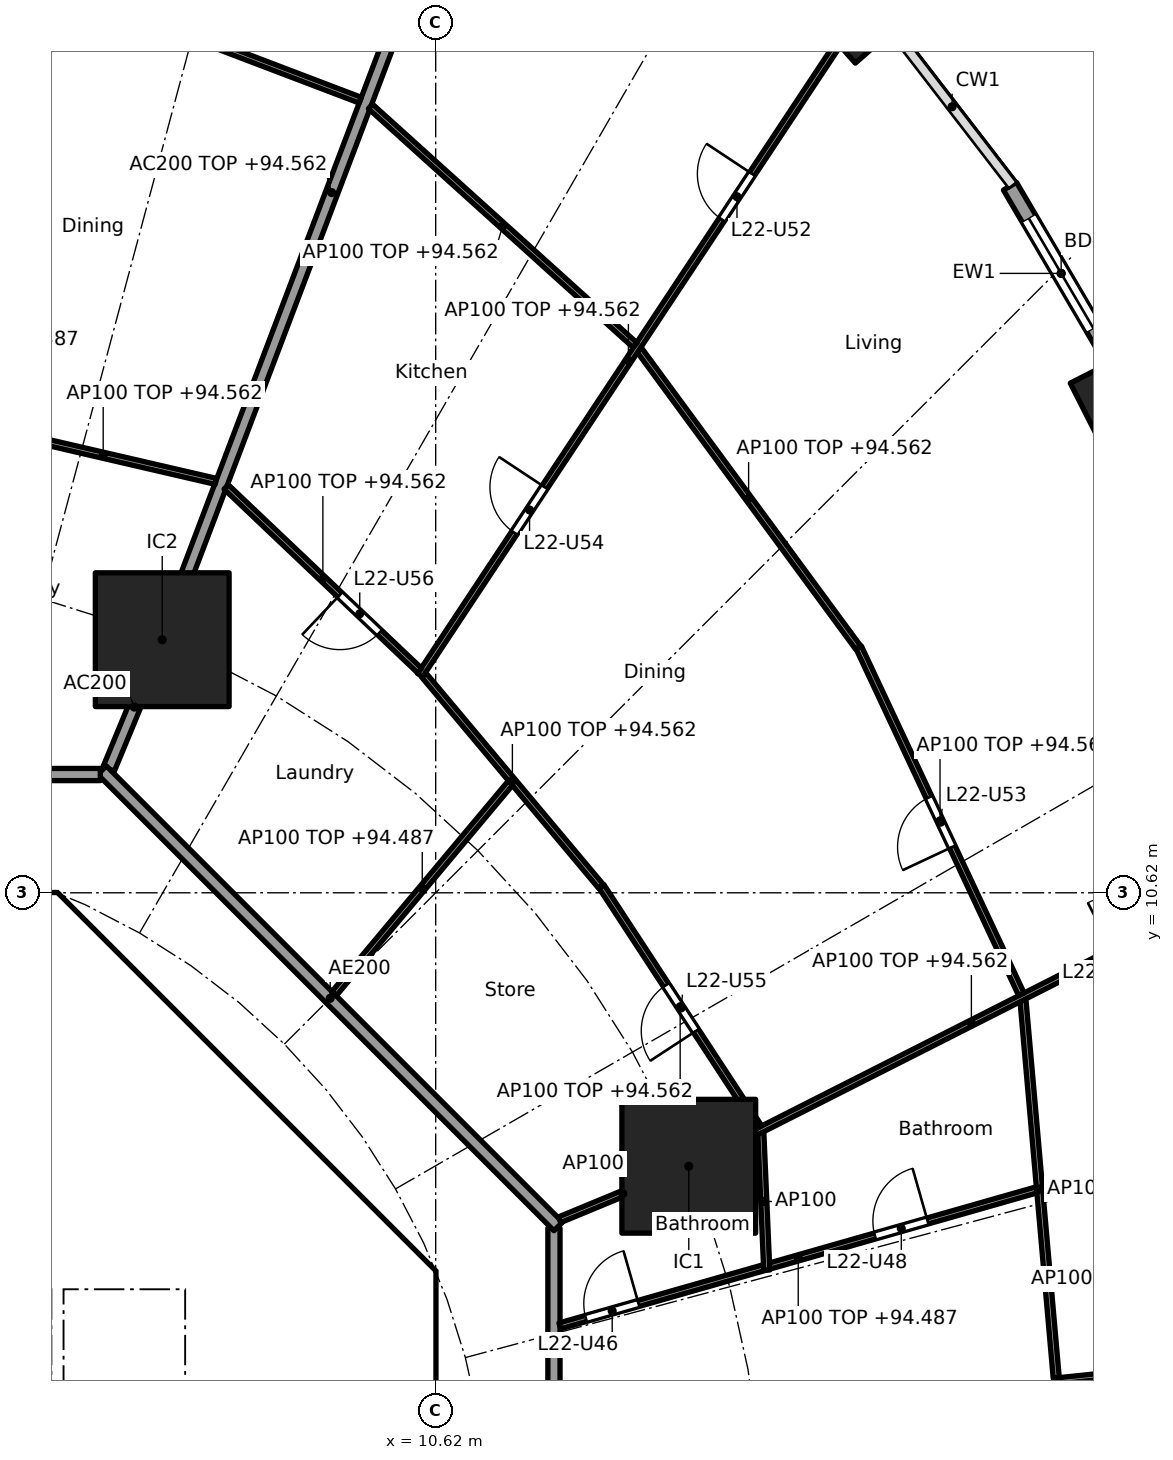
"""IFC4 building model, lengths in metres.
Left out: names, types, materials, properties, quantities, classifications, styles, units other than length and angle.
Written with IfcOpenShell. Run it as: python <this file> out.ifc"""

import sys

from ifc_helpers import new_model, si_unit, direction, frame, frame_2d, origin, origin_2d, place, context, subcontext, project, spatial, polyline, rectangle, hollow_rectangle, outline, extrude, element, fill, save


model = new_model("IFC4")
c1 = context("Model", 3, precision=1e-05, world=origin(), true_north=direction((0.0, 1.0)))
c2 = subcontext(c1, "Body", "Model", "MODEL_VIEW")
j1 = project(units=[si_unit("LENGTHUNIT", "METRE"), si_unit("PLANEANGLEUNIT", "RADIAN")], contexts=[c1])
p1 = place(None, origin())
s1 = spatial("IfcSite", under=j1, at=p1, CompositionType="ELEMENT")
p2 = place(p1, origin())
s2 = spatial("IfcBuilding", under=s1, at=p2, CompositionType="ELEMENT")
p3 = place(p2, frame((0.0, 0.0, 91.8)))
s3 = spatial("IfcBuildingStorey", under=s2, at=p3, CompositionType="ELEMENT", Elevation=91.8)
for number, where, z_axis, x_axis in (
    (1, (21.751, 18.625, 0.0), (0.0, 0.0, 1.0), (-0.452, 0.892, 0.0)),
    (2, (17.43, 25.049, 0.0), (0.0, 0.0, 1.0), (-0.66, 0.751, 0.0)),
):
    element("IfcColumn", number, at=place(p3, frame(where, z_axis=z_axis, x_axis=x_axis)), inside=s3, PredefinedType="COLUMN", context=c2, shape_type="SweptSolid", body=[
        extrude(hollow_rectangle(XDim=1.3, YDim=0.9, WallThickness=0.045, at=origin_2d()), origin(), (0.0, 0.0, 1.0), 3.7),
    ])
for number, where, z_axis, x_axis in (
    (3, (14.782, 6.123, 0.0), (0.0, 0.0, 1.0), (1.0, 0.0, 0.0)),
    (4, (6.123, 14.782, 0.0), (0.0, 0.0, 1.0), (1.0, 0.0, 0.0)),
):
    element("IfcColumn", number, at=place(p3, frame(where, z_axis=z_axis, x_axis=x_axis)), inside=s3, PredefinedType="COLUMN", context=c2, shape_type="SweptSolid", body=[
        extrude(rectangle(XDim=2.2, YDim=2.2, at=origin_2d()), origin(), (0.0, 0.0, 1.0), 3.7),
    ])
p4 = place(p3, frame((20.064, 22.24, 0.0), z_axis=(0.0, 0.0, 1.0), x_axis=(0.506297921217, -0.862358634775, 0.0)))
e5 = element("IfcWall", 5, at=p4, inside=s3, PredefinedType="SOLIDWALL", context=c2, shape_type="SweptSolid", body=[
    extrude(rectangle(XDim=3.325, YDim=0.25, at=frame_2d((1.662, 0.0))), origin(), (0.0, 0.0, 1.0), 3.44),
])
p5 = place(p4, frame((0.612, 0.0, 0.0)))
e6 = element("IfcOpeningElement", 6, at=p5, cuts=e5, PredefinedType="OPENING", context=c2, shape_type="SweptSolid", body=[
    extrude(rectangle(XDim=2.1, YDim=2.4, at=frame_2d((1.05, 1.2))), frame((0.0, 0.135, 0.0), z_axis=(0.0, -1.0, 0.0), x_axis=(1.0, 0.0, 0.0)), (0.0, 0.0, 1.0), 0.27),
])
p6 = place(p3, frame((9.988, 4.613, 0.0), z_axis=(0.0, 0.0, 1.0), x_axis=(-0.707106781187, 0.707106781187, 0.0)))
e7 = element("IfcWall", 7, at=p6, inside=s3, PredefinedType="SHEAR", context=c2, shape_type="SweptSolid", body=[
    extrude(rectangle(XDim=7.602, YDim=0.6, at=frame_2d((3.801, 0.0))), origin(), (0.0, 0.0, 1.0), 3.44),
])
p7 = place(p6, frame((3.201, 0.0, 0.0)))
e8 = element("IfcOpeningElement", 8, at=p7, cuts=e7, PredefinedType="OPENING", context=c2, shape_type="SweptSolid", body=[
    extrude(rectangle(XDim=1.2, YDim=2.1, at=frame_2d((0.6, 1.05))), frame((0.0, 0.31, 0.0), z_axis=(0.0, -1.0, 0.0), x_axis=(1.0, 0.0, 0.0)), (0.0, 0.0, 1.0), 0.62),
])
p8 = place(p3, frame((6.7, 4.0, 0.0), z_axis=(0.0, 0.0, 1.0), x_axis=(1.0, 0.0, 0.0)))
e9 = element("IfcWall", 9, at=p8, inside=s3, PredefinedType="SOLIDWALL", context=c2, shape_type="SweptSolid", body=[
    extrude(rectangle(XDim=3.325, YDim=0.2, at=frame_2d((1.662, 0.0))), origin(), (0.0, 0.0, 1.0), 3.44),
])
p9 = place(p8, frame((1.25, 0.0, 0.0)))
e10 = element("IfcOpeningElement", 10, at=p9, cuts=e9, PredefinedType="OPENING", context=c2, shape_type="SweptSolid", body=[
    extrude(rectangle(XDim=1.1, YDim=2.1, at=frame_2d((0.55, 1.05))), frame((0.0, 0.11, 0.0), z_axis=(0.0, -1.0, 0.0), x_axis=(1.0, 0.0, 0.0)), (0.0, 0.0, 1.0), 0.22),
])
p10 = place(p3, origin())
e11 = element("IfcWall", 11, at=p10, inside=s3, PredefinedType="SHEAR", context=c2, shape_type="SweptSolid", body=[
    extrude(outline(polyline([(-4.152, 10.025), (-4.401, 9.776), (-4.825, 10.2), (-4.401, 10.625), (4.401, 10.625), (4.825, 10.2), (4.401, 9.776), (4.152, 10.025), (-4.152, 10.025)])), origin(), (0.0, 0.0, 1.0), 3.44),
])
p11 = place(p3, origin())
e12 = element("IfcWall", 12, at=p11, inside=s3, PredefinedType="SHEAR", context=c2, shape_type="SweptSolid", body=[
    extrude(outline(polyline([(9.776, -4.401), (10.025, -4.152), (10.025, -3.801), (10.025, 4.152), (9.776, 4.401), (10.2, 4.825), (10.625, 4.401), (10.625, -4.401), (10.2, -4.825), (9.776, -4.401)])), origin(), (0.0, 0.0, 1.0), 3.44),
])
p12 = place(p3, origin())
e13 = element("IfcWall", 13, at=p12, inside=s3, PredefinedType="SOLIDWALL", context=c2, shape_type="SweptSolid", body=[
    extrude(outline(polyline([(-6.5, 2.1), (-6.7, 2.1), (-6.7, 4.3), (6.7, 4.3), (6.7, 2.1), (6.5, 2.1), (6.5, 4.1), (4.5, 4.1), (4.5, 2.1), (4.3, 2.1), (4.3, 4.1), (2.3, 4.1), (2.3, 2.1), (2.1, 2.1), (2.1, 4.1), (0.1, 4.1), (0.1, 2.1), (-0.1, 2.1), (-0.1, 4.1), (-2.1, 4.1), (-2.1, 2.1), (-2.3, 2.1), (-2.3, 4.1), (-4.3, 4.1), (-4.3, 2.1), (-4.5, 2.1), (-4.5, 4.1), (-6.5, 4.1), (-6.5, 2.1)])), origin(), (0.0, 0.0, 1.0), 3.44),
])
p13 = place(p3, origin())
e14 = element("IfcWall", 14, at=p13, inside=s3, PredefinedType="SOLIDWALL", context=c2, shape_type="SweptSolid", body=[
    extrude(outline(polyline([(7.025, -3.9), (6.7, -3.9), (6.7, 3.9), (7.025, 3.9), (7.025, -3.9)])), origin(), (0.0, 0.0, 1.0), 3.44),
])
p14 = place(p3, frame((5.243, 12.657, 0.0), z_axis=(0.0, 0.0, 1.0), x_axis=(0.382724096228, 0.923862687939, 0.0)))
e15 = element("IfcWall", 15, at=p14, inside=s3, PredefinedType="PARTITIONING", context=c2, shape_type="SweptSolid", body=[
    extrude(rectangle(XDim=2.201, YDim=0.2, at=frame_2d((1.1, 0.0))), origin(), (0.0, 0.0, 1.0), 3.44),
])
p15 = place(p3, frame((6.141, 14.829, 0.0), z_axis=(0.0, 0.0, 1.0), x_axis=(0.354477134193, 0.935064682968, 0.0)))
e16 = element("IfcWall", 16, at=p15, inside=s3, PredefinedType="PARTITIONING", context=c2, shape_type="SweptSolid", body=[
    extrude(rectangle(XDim=15.626, YDim=0.2, at=frame_2d((7.813, 0.0))), origin(), (0.0, 0.0, 1.0), 2.762),
])
p16 = place(p3, frame((12.565, -5.104, 0.0), z_axis=(0.0, 0.0, 1.0), x_axis=(0.0, 1.0, 0.0)))
e17 = element("IfcWall", 17, at=p16, inside=s3, PredefinedType="PARTITIONING", context=c2, shape_type="SweptSolid", body=[
    extrude(rectangle(XDim=10.209, YDim=0.2, at=frame_2d((5.104, 0.0))), origin(), (0.0, 0.0, 1.0), 3.44),
])
p17 = place(p16, frame((6.339, 0.0, 0.0)))
e18 = element("IfcOpeningElement", 18, at=p17, cuts=e17, PredefinedType="OPENING", context=c2, shape_type="SweptSolid", body=[
    extrude(rectangle(XDim=1.0, YDim=2.1, at=frame_2d((0.5, 1.05))), frame((0.0, 0.11, 0.0), z_axis=(0.0, -1.0, 0.0), x_axis=(1.0, 0.0, 0.0)), (0.0, 0.0, 1.0), 0.22),
])
p18 = place(p3, frame((12.635, 5.134, 0.0), z_axis=(0.0, 0.0, 1.0), x_axis=(-0.707106781187, 0.707106781187, 0.0)))
e19 = element("IfcWall", 19, at=p18, inside=s3, PredefinedType="PARTITIONING", context=c2, shape_type="SweptSolid", body=[
    extrude(rectangle(XDim=10.609, YDim=0.2, at=frame_2d((5.305, 0.0))), origin(), (0.0, 0.0, 1.0), 3.44),
])
p19 = place(p3, frame((5.104, 12.565, 0.0), z_axis=(0.0, 0.0, 1.0), x_axis=(-1.0, 0.0, 0.0)))
e20 = element("IfcWall", 20, at=p19, inside=s3, PredefinedType="PARTITIONING", context=c2, shape_type="SweptSolid", body=[
    extrude(rectangle(XDim=10.409, YDim=0.2, at=frame_2d((5.205, 0.0))), origin(), (0.0, 0.0, 1.0), 3.44),
])
p20 = place(p19, frame((8.508, 0.0, 0.0)))
e21 = element("IfcOpeningElement", 21, at=p20, cuts=e20, PredefinedType="OPENING", context=c2, shape_type="SweptSolid", body=[
    extrude(rectangle(XDim=1.0, YDim=2.1, at=frame_2d((0.5, 1.05))), frame((0.0, 0.11, 0.0), z_axis=(0.0, -1.0, 0.0), x_axis=(1.0, 0.0, 0.0)), (0.0, 0.0, 1.0), 0.22),
])
p21 = place(p3, frame((20.879, 2.597, 0.0), z_axis=(0.0, 0.0, 1.0), x_axis=(0.994666546694, 0.103142914868, 0.0)))
e22 = element("IfcWall", 22, at=p21, inside=s3, PredefinedType="PARTITIONING", context=c2, shape_type="SweptSolid", body=[
    extrude(rectangle(XDim=3.998, YDim=0.1, at=frame_2d((1.999, 0.0))), origin(), (0.0, 0.0, 1.0), 2.762),
])
p22 = place(p21, frame((1.549, 0.0, 0.0)))
e23 = element("IfcOpeningElement", 23, at=p22, cuts=e22, PredefinedType="OPENING", context=c2, shape_type="SweptSolid", body=[
    extrude(rectangle(XDim=0.9, YDim=2.1, at=frame_2d((0.45, 1.05))), frame((0.0, 0.06, 0.0), z_axis=(0.0, -1.0, 0.0), x_axis=(1.0, 0.0, 0.0)), (0.0, 0.0, 1.0), 0.12),
])
p23 = place(p3, frame((20.825, 2.642, 0.0), z_axis=(0.0, 0.0, 1.0), x_axis=(-0.08776129045, 0.99614153407, 0.0)))
e24 = element("IfcWall", 24, at=p23, inside=s3, PredefinedType="PARTITIONING", context=c2, shape_type="SweptSolid", body=[
    extrude(rectangle(XDim=6.237, YDim=0.1, at=frame_2d((3.119, 0.0))), origin(), (0.0, 0.0, 1.0), 2.762),
])
p24 = place(p3, frame((20.834, 2.642, 0.0), z_axis=(0.0, 0.0, 1.0), x_axis=(-0.091385407685, -0.995815599025, 0.0)))
e25 = element("IfcWall", 25, at=p24, inside=s3, PredefinedType="PARTITIONING", context=c2, shape_type="SweptSolid", body=[
    extrude(rectangle(XDim=6.502, YDim=0.1, at=frame_2d((3.251, 0.0))), origin(), (0.0, 0.0, 1.0), 2.762),
])
p25 = place(p24, frame((1.201, 0.0, 0.0)))
e26 = element("IfcOpeningElement", 26, at=p25, cuts=e25, PredefinedType="OPENING", context=c2, shape_type="SweptSolid", body=[
    extrude(rectangle(XDim=0.9, YDim=2.1, at=frame_2d((0.45, 1.05))), frame((0.0, 0.06, 0.0), z_axis=(0.0, -1.0, 0.0), x_axis=(1.0, 0.0, 0.0)), (0.0, 0.0, 1.0), 0.12),
])
p26 = place(p3, frame((12.661, 3.497, 0.0), z_axis=(0.0, 0.0, 1.0), x_axis=(0.961626678623, 0.274361314621, 0.0)))
e27 = element("IfcWall", 27, at=p26, inside=s3, PredefinedType="PARTITIONING", context=c2, shape_type="SweptSolid", body=[
    extrude(rectangle(XDim=8.156, YDim=0.1, at=frame_2d((4.078, 0.0))), origin(), (0.0, 0.0, 1.0), 2.687),
])
p27 = place(p26, frame((0.446, 0.0, 0.0)))
e28 = element("IfcOpeningElement", 28, at=p27, cuts=e27, PredefinedType="OPENING", context=c2, shape_type="SweptSolid", body=[
    extrude(rectangle(XDim=0.9, YDim=2.1, at=frame_2d((0.45, 1.05))), frame((0.0, 0.06, 0.0), z_axis=(0.0, -1.0, 0.0), x_axis=(1.0, 0.0, 0.0)), (0.0, 0.0, 1.0), 0.12),
])
p28 = place(p26, frame((5.39, 0.0, 0.0)))
e29 = element("IfcOpeningElement", 29, at=p28, cuts=e27, PredefinedType="OPENING", context=c2, shape_type="SweptSolid", body=[
    extrude(rectangle(XDim=0.9, YDim=2.1, at=frame_2d((0.45, 1.05))), frame((0.0, 0.06, 0.0), z_axis=(0.0, -1.0, 0.0), x_axis=(1.0, 0.0, 0.0)), (0.0, 0.0, 1.0), 0.12),
])
p29 = place(p3, frame((16.064, 4.415, 0.0), z_axis=(0.0, 0.0, 1.0), x_axis=(-0.043118325477, 0.999069972528, 0.0)))
e30 = element("IfcWall", 30, at=p29, inside=s3, PredefinedType="PARTITIONING", context=c2, shape_type="SweptSolid", body=[
    extrude(rectangle(XDim=2.259, YDim=0.1, at=frame_2d((1.13, 0.0))), origin(), (0.0, 0.0, 1.0), 3.44),
])
p30 = place(p3, frame((12.657, 5.243, 0.0), z_axis=(0.0, 0.0, 1.0), x_axis=(0.923848837015, 0.382757529444, 0.0)))
e31 = element("IfcWall", 31, at=p30, inside=s3, PredefinedType="PARTITIONING", context=c2, shape_type="SweptSolid", body=[
    extrude(rectangle(XDim=2.25, YDim=0.1, at=frame_2d((1.125, 0.0))), origin(), (0.0, 0.0, 1.0), 3.44),
])
p31 = place(p3, frame((14.827, 6.146, 0.0), z_axis=(0.0, 0.0, 1.0), x_axis=(0.892068075337, 0.451901038906, 0.0)))
e32 = element("IfcWall", 32, at=p31, inside=s3, PredefinedType="PARTITIONING", context=c2, shape_type="SweptSolid", body=[
    extrude(rectangle(XDim=10.32, YDim=0.1, at=frame_2d((5.16, 0.0))), origin(), (0.0, 0.0, 1.0), 2.762),
])
p32 = place(p31, frame((7.763, 0.0, 0.0)))
e33 = element("IfcOpeningElement", 33, at=p32, cuts=e32, PredefinedType="OPENING", context=c2, shape_type="SweptSolid", body=[
    extrude(rectangle(XDim=0.9, YDim=2.1, at=frame_2d((0.45, 1.05))), frame((0.0, 0.06, 0.0), z_axis=(0.0, -1.0, 0.0), x_axis=(1.0, 0.0, 0.0)), (0.0, 0.0, 1.0), 0.12),
])
p33 = place(p3, frame((15.938, 6.764, 0.0), z_axis=(0.0, 0.0, 1.0), x_axis=(-0.547472878942, 0.836823426311, 0.0)))
e34 = element("IfcWall", 34, at=p33, inside=s3, PredefinedType="PARTITIONING", context=c2, shape_type="SweptSolid", body=[
    extrude(rectangle(XDim=4.738, YDim=0.1, at=frame_2d((2.369, 0.0))), origin(), (0.0, 0.0, 1.0), 2.762),
])
p34 = place(p33, frame((1.894, 0.0, 0.0)))
e35 = element("IfcOpeningElement", 35, at=p34, cuts=e34, PredefinedType="OPENING", context=c2, shape_type="SweptSolid", body=[
    extrude(rectangle(XDim=0.9, YDim=2.1, at=frame_2d((0.45, 1.05))), frame((0.0, 0.06, 0.0), z_axis=(0.0, -1.0, 0.0), x_axis=(1.0, 0.0, 0.0)), (0.0, 0.0, 1.0), 0.12),
])
p35 = place(p3, frame((20.252, 8.95, 0.0), z_axis=(0.0, 0.0, 1.0), x_axis=(-0.424580709335, 0.905390093419, 0.0)))
e36 = element("IfcWall", 36, at=p35, inside=s3, PredefinedType="PARTITIONING", context=c2, shape_type="SweptSolid", body=[
    extrude(rectangle(XDim=6.304, YDim=0.1, at=frame_2d((3.152, 0.0))), origin(), (0.0, 0.0, 1.0), 2.762),
])
p36 = place(p35, frame((2.677, 0.0, 0.0)))
e37 = element("IfcOpeningElement", 37, at=p36, cuts=e36, PredefinedType="OPENING", context=c2, shape_type="SweptSolid", body=[
    extrude(rectangle(XDim=0.9, YDim=2.1, at=frame_2d((0.45, 1.05))), frame((0.0, 0.06, 0.0), z_axis=(0.0, -1.0, 0.0), x_axis=(1.0, 0.0, 0.0)), (0.0, 0.0, 1.0), 0.12),
])
p37 = place(p3, frame((13.339, 10.725, 0.0), z_axis=(0.0, 0.0, 1.0), x_axis=(-0.642515455924, 0.766272724882, 0.0)))
e38 = element("IfcWall", 38, at=p37, inside=s3, PredefinedType="PARTITIONING", context=c2, shape_type="SweptSolid", body=[
    extrude(rectangle(XDim=4.537, YDim=0.1, at=frame_2d((2.269, 0.0))), origin(), (0.0, 0.0, 1.0), 2.762),
])
p38 = place(p3, frame((17.567, 14.653, 0.0), z_axis=(0.0, 0.0, 1.0), x_axis=(-0.592391983588, 0.80564988536, 0.0)))
e39 = element("IfcWall", 39, at=p38, inside=s3, PredefinedType="PARTITIONING", context=c2, shape_type="SweptSolid", body=[
    extrude(rectangle(XDim=6.08, YDim=0.1, at=frame_2d((3.04, 0.0))), origin(), (0.0, 0.0, 1.0), 2.762),
])
p39 = place(p3, frame((8.949, 8.961, 0.0), z_axis=(0.0, 0.0, 1.0), x_axis=(0.642048217601, 0.766664259162, 0.0)))
e40 = element("IfcWall", 40, at=p39, inside=s3, PredefinedType="PARTITIONING", context=c2, shape_type="SweptSolid", body=[
    extrude(rectangle(XDim=4.518, YDim=0.1, at=frame_2d((2.259, 0.0))), origin(), (0.0, 0.0, 1.0), 2.687),
])
p40 = place(p3, frame((10.364, 14.198, 0.0), z_axis=(0.0, 0.0, 1.0), x_axis=(0.552104552927, 0.833774887267, 0.0)))
e41 = element("IfcWall", 41, at=p40, inside=s3, PredefinedType="PARTITIONING", context=c2, shape_type="SweptSolid", body=[
    extrude(rectangle(XDim=12.407, YDim=0.1, at=frame_2d((6.203, 0.0))), origin(), (0.0, 0.0, 1.0), 2.762),
])
p41 = place(p40, frame((8.988, 0.0, 0.0)))
e42 = element("IfcOpeningElement", 42, at=p41, cuts=e41, PredefinedType="OPENING", context=c2, shape_type="SweptSolid", body=[
    extrude(rectangle(XDim=0.9, YDim=2.1, at=frame_2d((0.45, 1.05))), frame((0.0, 0.06, 0.0), z_axis=(0.0, -1.0, 0.0), x_axis=(1.0, 0.0, 0.0)), (0.0, 0.0, 1.0), 0.12),
])
p42 = place(p40, frame((2.809, 0.0, 0.0)))
e43 = element("IfcOpeningElement", 43, at=p42, cuts=e41, PredefinedType="OPENING", context=c2, shape_type="SweptSolid", body=[
    extrude(rectangle(XDim=0.9, YDim=2.1, at=frame_2d((0.45, 1.05))), frame((0.0, 0.06, 0.0), z_axis=(0.0, -1.0, 0.0), x_axis=(1.0, 0.0, 0.0)), (0.0, 0.0, 1.0), 0.12),
])
p43 = place(p3, frame((10.355, 14.274, 0.0), z_axis=(0.0, 0.0, 1.0), x_axis=(-0.725206433622, 0.688531501555, 0.0)))
e44 = element("IfcWall", 44, at=p43, inside=s3, PredefinedType="PARTITIONING", context=c2, shape_type="SweptSolid", body=[
    extrude(rectangle(XDim=4.387, YDim=0.1, at=frame_2d((2.193, 0.0))), origin(), (0.0, 0.0, 1.0), 2.762),
])
p44 = place(p43, frame((0.907, 0.0, 0.0)))
e45 = element("IfcOpeningElement", 45, at=p44, cuts=e44, PredefinedType="OPENING", context=c2, shape_type="SweptSolid", body=[
    extrude(rectangle(XDim=0.9, YDim=2.1, at=frame_2d((0.45, 1.05))), frame((0.0, 0.06, 0.0), z_axis=(0.0, -1.0, 0.0), x_axis=(1.0, 0.0, 0.0)), (0.0, 0.0, 1.0), 0.12),
])
p45 = place(p3, frame((13.898, 19.625, 0.0), z_axis=(0.0, 0.0, 1.0), x_axis=(-0.742396654702, 0.669960601146, 0.0)))
e46 = element("IfcWall", 46, at=p45, inside=s3, PredefinedType="PARTITIONING", context=c2, shape_type="SweptSolid", body=[
    extrude(rectangle(XDim=5.861, YDim=0.1, at=frame_2d((2.931, 0.0))), origin(), (0.0, 0.0, 1.0), 2.762),
])
p46 = place(p3, frame((7.004, 17.386, 0.0), z_axis=(0.0, 0.0, 1.0), x_axis=(-0.974179728512, 0.225773905837, 0.0)))
e47 = element("IfcWall", 47, at=p46, inside=s3, PredefinedType="PARTITIONING", context=c2, shape_type="SweptSolid", body=[
    extrude(rectangle(XDim=3.802, YDim=0.1, at=frame_2d((1.901, 0.0))), origin(), (0.0, 0.0, 1.0), 2.762),
])
p47 = place(p3, frame((9.379, 23.655, 0.0), z_axis=(0.0, 0.0, 1.0), x_axis=(-0.934613076136, 0.355666132653, 0.0)))
e48 = element("IfcWall", 48, at=p47, inside=s3, PredefinedType="PARTITIONING", context=c2, shape_type="SweptSolid", body=[
    extrude(rectangle(XDim=5.366, YDim=0.1, at=frame_2d((2.683, 0.0))), origin(), (0.0, 0.0, 1.0), 2.762),
])
p48 = place(p5, origin())
e49 = element("IfcDoor", 49, at=p48, inside=s3, OperationType="SLIDING_TO_LEFT", PredefinedType="DOOR", context=c2, shape_type="SweptSolid", body=[
    extrude(rectangle(XDim=2.1, YDim=2.4, at=frame_2d((1.05, 1.2))), frame((0.0, 0.025, 0.0), z_axis=(0.0, -1.0, 0.0), x_axis=(1.0, 0.0, 0.0)), (0.0, 0.0, 1.0), 0.05),
])
fill(e6, e49)
p49 = place(p9, frame((1.1, 0.0, 0.0), x_axis=(-1.0, 0.0, 0.0)))
e50 = element("IfcDoor", 50, at=p49, inside=s3, OperationType="SINGLE_SWING_RIGHT", PredefinedType="DOOR", context=c2, shape_type="SweptSolid", body=[
    extrude(rectangle(XDim=1.1, YDim=2.1, at=frame_2d((0.55, 1.05))), frame((0.0, 0.025, 0.0), z_axis=(0.0, -1.0, 0.0), x_axis=(1.0, 0.0, 0.0)), (0.0, 0.0, 1.0), 0.05),
])
fill(e10, e50)
p50 = place(p7, origin())
e51 = element("IfcDoor", 51, at=p50, inside=s3, OperationType="SINGLE_SWING_RIGHT", PredefinedType="DOOR", context=c2, shape_type="SweptSolid", body=[
    extrude(rectangle(XDim=1.2, YDim=2.1, at=frame_2d((0.6, 1.05))), frame((0.0, 0.025, 0.0), z_axis=(0.0, -1.0, 0.0), x_axis=(1.0, 0.0, 0.0)), (0.0, 0.0, 1.0), 0.05),
])
fill(e8, e51)
p51 = place(p27, origin())
e52 = element("IfcDoor", 52, at=p51, inside=s3, OperationType="SINGLE_SWING_RIGHT", PredefinedType="DOOR", context=c2, shape_type="SweptSolid", body=[
    extrude(rectangle(XDim=0.9, YDim=2.1, at=frame_2d((0.45, 1.05))), frame((0.0, 0.025, 0.0), z_axis=(0.0, -1.0, 0.0), x_axis=(1.0, 0.0, 0.0)), (0.0, 0.0, 1.0), 0.05),
])
fill(e28, e52)
p52 = place(p28, origin())
e53 = element("IfcDoor", 53, at=p52, inside=s3, OperationType="SINGLE_SWING_RIGHT", PredefinedType="DOOR", context=c2, shape_type="SweptSolid", body=[
    extrude(rectangle(XDim=0.9, YDim=2.1, at=frame_2d((0.45, 1.05))), frame((0.0, 0.025, 0.0), z_axis=(0.0, -1.0, 0.0), x_axis=(1.0, 0.0, 0.0)), (0.0, 0.0, 1.0), 0.05),
])
fill(e29, e53)
p53 = place(p41, origin())
e54 = element("IfcDoor", 54, at=p53, inside=s3, OperationType="SINGLE_SWING_RIGHT", PredefinedType="DOOR", context=c2, shape_type="SweptSolid", body=[
    extrude(rectangle(XDim=0.9, YDim=2.1, at=frame_2d((0.45, 1.05))), frame((0.0, 0.025, 0.0), z_axis=(0.0, -1.0, 0.0), x_axis=(1.0, 0.0, 0.0)), (0.0, 0.0, 1.0), 0.05),
])
fill(e42, e54)
p54 = place(p36, origin())
e55 = element("IfcDoor", 55, at=p54, inside=s3, OperationType="SINGLE_SWING_LEFT", PredefinedType="DOOR", context=c2, shape_type="SweptSolid", body=[
    extrude(rectangle(XDim=0.9, YDim=2.1, at=frame_2d((0.45, 1.05))), frame((0.0, 0.025, 0.0), z_axis=(0.0, -1.0, 0.0), x_axis=(1.0, 0.0, 0.0)), (0.0, 0.0, 1.0), 0.05),
])
fill(e37, e55)
p55 = place(p42, origin())
e56 = element("IfcDoor", 56, at=p55, inside=s3, OperationType="SINGLE_SWING_RIGHT", PredefinedType="DOOR", context=c2, shape_type="SweptSolid", body=[
    extrude(rectangle(XDim=0.9, YDim=2.1, at=frame_2d((0.45, 1.05))), frame((0.0, 0.025, 0.0), z_axis=(0.0, -1.0, 0.0), x_axis=(1.0, 0.0, 0.0)), (0.0, 0.0, 1.0), 0.05),
])
fill(e43, e56)
p56 = place(p34, origin())
e57 = element("IfcDoor", 57, at=p56, inside=s3, OperationType="SINGLE_SWING_LEFT", PredefinedType="DOOR", context=c2, shape_type="SweptSolid", body=[
    extrude(rectangle(XDim=0.9, YDim=2.1, at=frame_2d((0.45, 1.05))), frame((0.0, 0.025, 0.0), z_axis=(0.0, -1.0, 0.0), x_axis=(1.0, 0.0, 0.0)), (0.0, 0.0, 1.0), 0.05),
])
fill(e35, e57)
p57 = place(p44, origin())
e58 = element("IfcDoor", 58, at=p57, inside=s3, OperationType="SINGLE_SWING_RIGHT", PredefinedType="DOOR", context=c2, shape_type="SweptSolid", body=[
    extrude(rectangle(XDim=0.9, YDim=2.1, at=frame_2d((0.45, 1.05))), frame((0.0, 0.025, 0.0), z_axis=(0.0, -1.0, 0.0), x_axis=(1.0, 0.0, 0.0)), (0.0, 0.0, 1.0), 0.05),
])
fill(e45, e58)
save(model, sys.argv[1])
